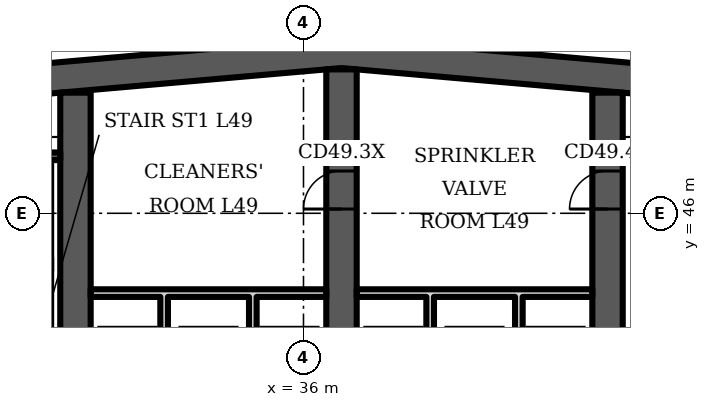
"""IFC4 building model, lengths in metres.
Left out: names, types, materials, properties, quantities, classifications, styles, units other than length and angle.
Written with IfcOpenShell. Run it as: python <this file> out.ifc"""

import sys

from ifc_helpers import new_model, si_unit, direction, frame, frame_2d, origin, place, context, subcontext, project, spatial, polyline, rectangle, outline, extrude, element, fill, save


model = new_model("IFC4")
c1 = context("Model", 3, precision=1e-05, world=origin(), true_north=direction((0.0, 1.0)))
c2 = subcontext(c1, "Body", "Model", "MODEL_VIEW")
j1 = project(units=[si_unit("LENGTHUNIT", "METRE"), si_unit("PLANEANGLEUNIT", "RADIAN")], contexts=[c1])
p1 = place(None, origin())
s1 = spatial("IfcSite", under=j1, at=p1, CompositionType="ELEMENT")
p2 = place(p1, origin())
s2 = spatial("IfcBuilding", under=s1, at=p2, CompositionType="ELEMENT")
p3 = place(p2, frame((0.0, 0.0, 198.7)))
s3 = spatial("IfcBuildingStorey", under=s2, at=p3, CompositionType="ELEMENT", Elevation=198.7)
p4 = place(p3, origin())
e1 = element("IfcWall", 1, at=p4, inside=s3, PredefinedType="SHEAR", context=c2, shape_type="SweptSolid", body=[
    extrude(outline(polyline([(16.0, 47.984), (37.0, 49.822), (58.0, 47.984), (58.0, 48.787), (37.0, 50.625), (16.0, 48.787), (16.0, 47.984)])), origin(), (0.0, 0.0, 1.0), 3.6),
])
p5 = place(p3, frame((30.0, 34.8, 0.0), z_axis=(0.0, 0.0, 1.0), x_axis=(0.0, 1.0, 0.0)))
e2 = element("IfcWall", 2, at=p5, inside=s3, PredefinedType="SHEAR", context=c2, shape_type="SweptSolid", body=[
    extrude(rectangle(XDim=14.374, YDim=0.8, at=frame_2d((7.187, 0.0))), origin(), (0.0, 0.0, 1.0), 3.6),
])
p6 = place(p5, frame((3.6, 0.0, 0.0)))
e3 = element("IfcOpeningElement", 3, at=p6, cuts=e2, PredefinedType="OPENING", context=c2, shape_type="SweptSolid", body=[
    extrude(rectangle(XDim=1.1, YDim=2.1, at=frame_2d((0.55, 1.05))), frame((0.0, 0.41, 0.0), z_axis=(0.0, -1.0, 0.0), x_axis=(1.0, 0.0, 0.0)), (0.0, 0.0, 1.0), 0.82),
])
p7 = place(p3, frame((37.0, 34.8, 0.0), z_axis=(0.0, 0.0, 1.0), x_axis=(0.0, 1.0, 0.0)))
e4 = element("IfcWall", 4, at=p7, inside=s3, PredefinedType="SHEAR", context=c2, shape_type="SweptSolid", body=[
    extrude(rectangle(XDim=14.987, YDim=0.8, at=frame_2d((7.493, 0.0))), origin(), (0.0, 0.0, 1.0), 3.6),
])
p8 = place(p7, frame((11.312, 0.0, 0.0)))
e5 = element("IfcOpeningElement", 5, at=p8, cuts=e4, PredefinedType="OPENING", context=c2, shape_type="SweptSolid", body=[
    extrude(rectangle(XDim=1.0, YDim=2.1, at=frame_2d((0.5, 1.05))), frame((0.0, 0.41, 0.0), z_axis=(0.0, -1.0, 0.0), x_axis=(1.0, 0.0, 0.0)), (0.0, 0.0, 1.0), 0.82),
])
p9 = place(p7, frame((3.6, 0.0, 0.0)))
e6 = element("IfcOpeningElement", 6, at=p9, cuts=e4, PredefinedType="OPENING", context=c2, shape_type="SweptSolid", body=[
    extrude(rectangle(XDim=1.1, YDim=2.1, at=frame_2d((0.55, 1.05))), frame((0.0, 0.41, 0.0), z_axis=(0.0, -1.0, 0.0), x_axis=(1.0, 0.0, 0.0)), (0.0, 0.0, 1.0), 0.82),
])
p10 = place(p3, frame((44.0, 34.8, 0.0), z_axis=(0.0, 0.0, 1.0), x_axis=(0.0, 1.0, 0.0)))
e7 = element("IfcWall", 7, at=p10, inside=s3, PredefinedType="SHEAR", context=c2, shape_type="SweptSolid", body=[
    extrude(rectangle(XDim=14.374, YDim=0.8, at=frame_2d((7.187, 0.0))), origin(), (0.0, 0.0, 1.0), 3.6),
])
p11 = place(p10, frame((11.312, 0.0, 0.0)))
e8 = element("IfcOpeningElement", 8, at=p11, cuts=e7, PredefinedType="OPENING", context=c2, shape_type="SweptSolid", body=[
    extrude(rectangle(XDim=1.0, YDim=2.1, at=frame_2d((0.5, 1.05))), frame((0.0, 0.41, 0.0), z_axis=(0.0, -1.0, 0.0), x_axis=(1.0, 0.0, 0.0)), (0.0, 0.0, 1.0), 0.82),
])
p12 = place(p10, frame((3.6, 0.0, 0.0)))
e9 = element("IfcOpeningElement", 9, at=p12, cuts=e7, PredefinedType="OPENING", context=c2, shape_type="SweptSolid", body=[
    extrude(rectangle(XDim=1.1, YDim=2.1, at=frame_2d((0.55, 1.05))), frame((0.0, 0.41, 0.0), z_axis=(0.0, -1.0, 0.0), x_axis=(1.0, 0.0, 0.0)), (0.0, 0.0, 1.0), 0.82),
])
p13 = place(p3, frame((25.75, 47.5, 0.0), z_axis=(0.0, 0.0, 1.0), x_axis=(1.0, 0.0, 0.0)))
e10 = element("IfcWall", 10, at=p13, inside=s3, PredefinedType="SHEAR", context=c2, shape_type="SweptSolid", body=[
    extrude(rectangle(XDim=3.85, YDim=0.2, at=frame_2d((1.925, 0.0))), origin(), (0.0, 0.0, 1.0), 3.15),
])
p14 = place(p3, origin())
e11 = element("IfcWall", 11, at=p14, inside=s3, PredefinedType="PARTITIONING", context=c2, shape_type="SweptSolid", body=[
    extrude(outline(polyline([(32.433, 40.8), (32.233, 40.8), (32.233, 43.8), (30.4, 43.8), (30.4, 44.0), (36.6, 44.0), (36.6, 43.8), (34.767, 43.8), (34.767, 40.8), (34.567, 40.8), (34.567, 43.8), (32.433, 43.8), (32.433, 40.8)])), origin(), (0.0, 0.0, 1.0), 3.15),
])
p15 = place(p3, origin())
e12 = element("IfcWall", 12, at=p15, inside=s3, PredefinedType="PARTITIONING", context=c2, shape_type="SweptSolid", body=[
    extrude(outline(polyline([(39.433, 40.8), (39.233, 40.8), (39.233, 43.8), (37.4, 43.8), (37.4, 44.0), (43.6, 44.0), (43.6, 43.8), (41.767, 43.8), (41.767, 40.8), (41.567, 40.8), (41.567, 43.8), (39.433, 43.8), (39.433, 40.8)])), origin(), (0.0, 0.0, 1.0), 3.15),
])
p16 = place(p8, origin())
e13 = element("IfcDoor", 13, at=p16, inside=s3, OperationType="SINGLE_SWING_LEFT", PredefinedType="DOOR", context=c2, shape_type="SweptSolid", body=[
    extrude(rectangle(XDim=1.0, YDim=2.1, at=frame_2d((0.5, 1.05))), frame((0.0, 0.4, 0.0), z_axis=(0.0, -1.0, 0.0), x_axis=(1.0, 0.0, 0.0)), (0.0, 0.0, 1.0), 0.8),
])
fill(e5, e13)
p17 = place(p11, origin())
e14 = element("IfcDoor", 14, at=p17, inside=s3, OperationType="SINGLE_SWING_LEFT", PredefinedType="DOOR", context=c2, shape_type="SweptSolid", body=[
    extrude(rectangle(XDim=1.0, YDim=2.1, at=frame_2d((0.5, 1.05))), frame((0.0, 0.4, 0.0), z_axis=(0.0, -1.0, 0.0), x_axis=(1.0, 0.0, 0.0)), (0.0, 0.0, 1.0), 0.8),
])
fill(e8, e14)
save(model, sys.argv[1])
